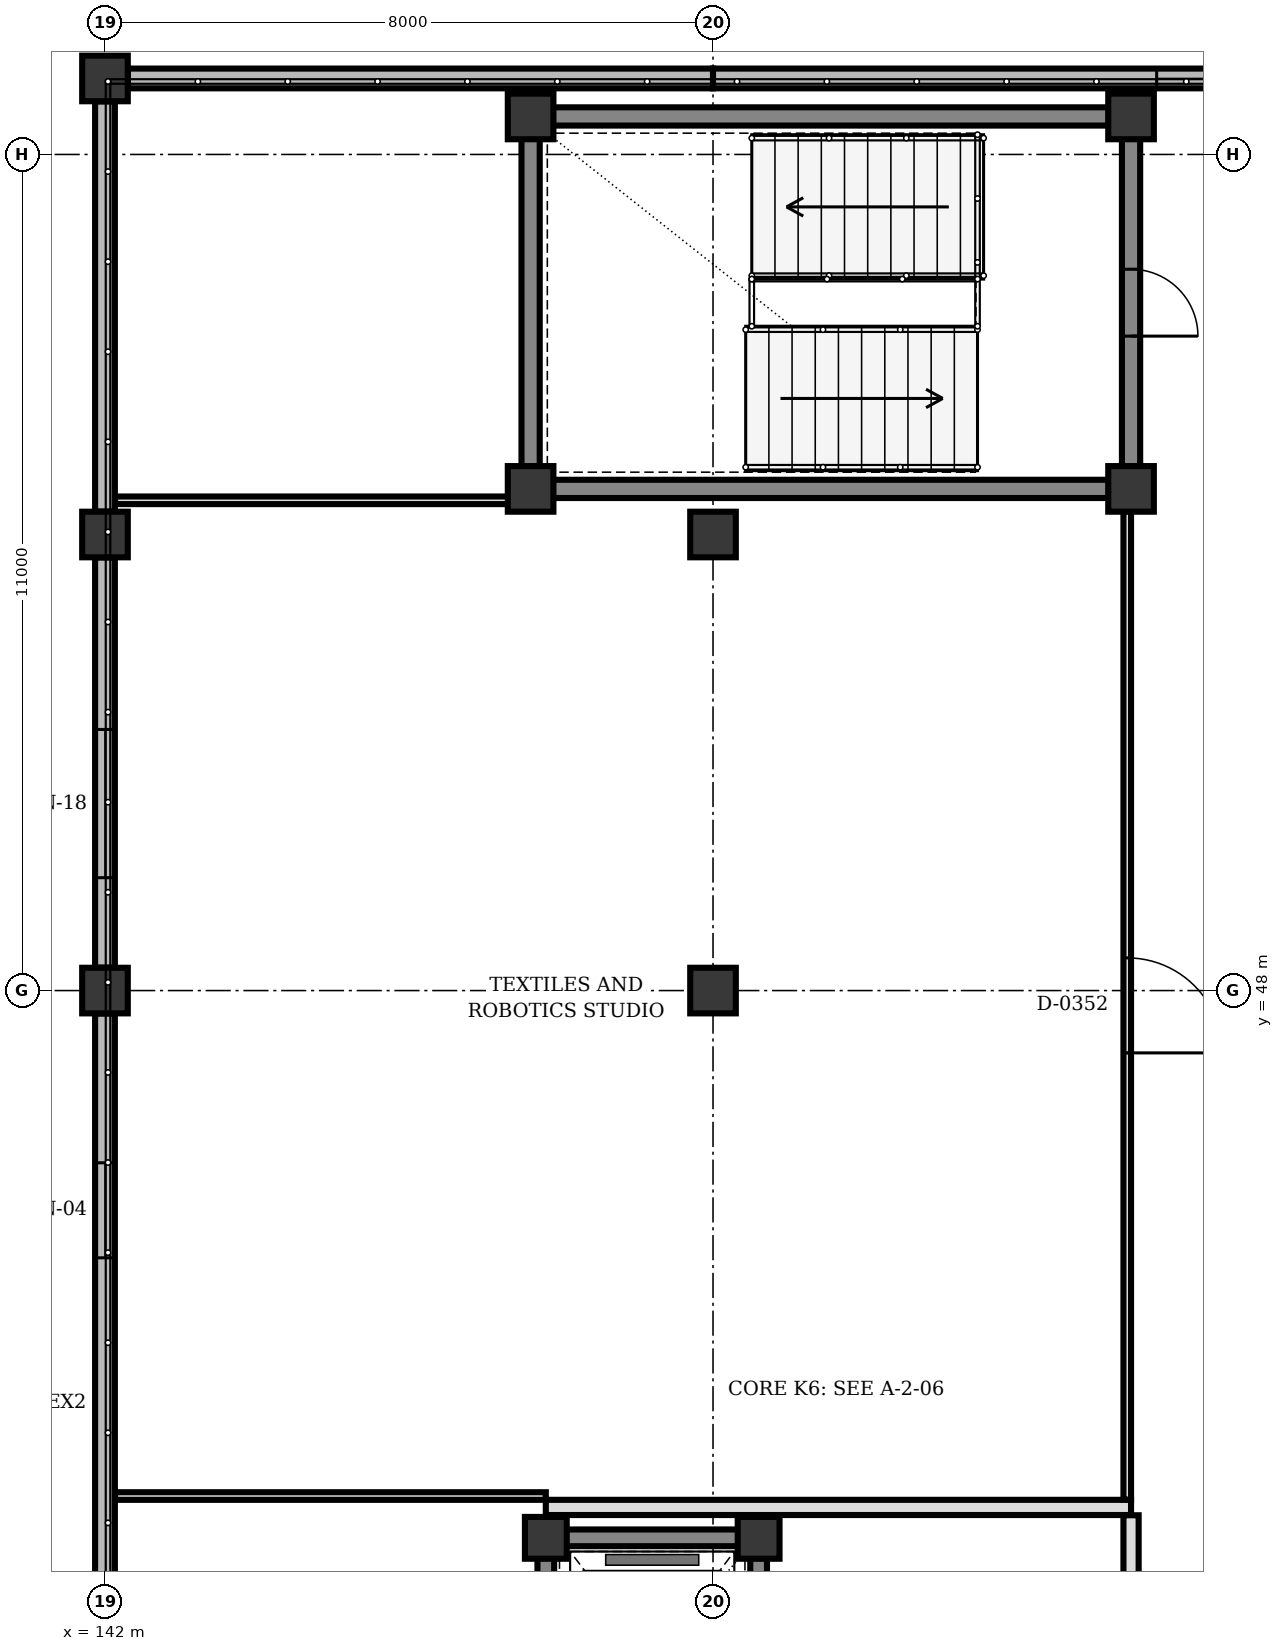
"""IFC4 building model, lengths in metres.
Left out: names, types, materials, properties, quantities, classifications, styles, units other than length and angle.
Written with IfcOpenShell. Run it as: python <this file> out.ifc"""

import sys

from ifc_helpers import new_model, si_unit, direction, frame, frame_2d, origin, origin_2d, place, context, subcontext, project, spatial, rectangle, extrude, element, fill, save


model = new_model("IFC4")
c1 = context("Model", 3, precision=1e-05, world=origin(), true_north=direction((0.0, 1.0)))
c2 = subcontext(c1, "Body", "Model", "MODEL_VIEW")
j1 = project(units=[si_unit("LENGTHUNIT", "METRE"), si_unit("PLANEANGLEUNIT", "RADIAN")], contexts=[c1])
p1 = place(None, origin())
s1 = spatial("IfcSite", under=j1, at=p1, CompositionType="ELEMENT")
p2 = place(p1, origin())
s2 = spatial("IfcBuilding", under=s1, at=p2, CompositionType="ELEMENT")
p3 = place(p2, frame((0.0, 0.0, 4.5)))
s3 = spatial("IfcBuildingStorey", under=s2, at=p3, CompositionType="ELEMENT", Elevation=4.5)
for number, where, z_axis, x_axis in (
    (1, (147.6, 54.6, 0.0), (0.0, 0.0, 1.0), (1.0, 0.0, 0.0)),
    (2, (155.5, 54.6, 0.0), (0.0, 0.0, 1.0), (1.0, 0.0, 0.0)),
    (3, (155.5, 59.5, 0.0), (0.0, 0.0, 1.0), (1.0, 0.0, 0.0)),
    (4, (147.6, 59.5, 0.0), (0.0, 0.0, 1.0), (1.0, 0.0, 0.0)),
):
    element("IfcColumn", number, at=place(p3, frame(where, z_axis=z_axis, x_axis=x_axis)), inside=s3, PredefinedType="COLUMN", context=c2, shape_type="SweptSolid", body=[
        extrude(rectangle(XDim=0.6, YDim=0.6, at=origin_2d()), origin(), (0.0, 0.0, 1.0), 4.0),
    ])
for number, where, z_axis, x_axis in (
    (5, (150.6, 40.8, 0.0), (0.0, 0.0, 1.0), (1.0, 0.0, 0.0)),
    (6, (147.8, 40.8, 0.0), (0.0, 0.0, 1.0), (1.0, 0.0, 0.0)),
):
    element("IfcColumn", number, at=place(p3, frame(where, z_axis=z_axis, x_axis=x_axis)), inside=s3, PredefinedType="COLUMN", context=c2, shape_type="SweptSolid", body=[
        extrude(rectangle(XDim=0.55, YDim=0.55, at=origin_2d()), origin(), (0.0, 0.0, 1.0), 4.0),
    ])
for number, where, z_axis, x_axis in (
    (7, (142.0, 48.0, 0.0), (0.0, 0.0, 1.0), (1.0, 0.0, 0.0)),
    (8, (142.0, 54.0, 0.0), (0.0, 0.0, 1.0), (1.0, 0.0, 0.0)),
    (9, (142.0, 60.0, 0.0), (0.0, 0.0, 1.0), (1.0, 0.0, 0.0)),
    (10, (150.0, 48.0, 0.0), (0.0, 0.0, 1.0), (1.0, 0.0, 0.0)),
    (11, (150.0, 54.0, 0.0), (0.0, 0.0, 1.0), (1.0, 0.0, 0.0)),
):
    element("IfcColumn", number, at=place(p3, frame(where, z_axis=z_axis, x_axis=x_axis)), inside=s3, PredefinedType="COLUMN", context=c2, shape_type="SweptSolid", body=[
        extrude(rectangle(XDim=0.6, YDim=0.6, at=origin_2d()), origin(), (0.0, 0.0, 1.0), 4.0),
    ])
p4 = place(p3, frame((142.0, 40.302, 0.0), z_axis=(0.0, 0.0, 1.0), x_axis=(0.0, 1.0, 0.0)))
e12 = element("IfcWall", 12, at=p4, inside=s3, PredefinedType="SOLIDWALL", context=c2, shape_type="SweptSolid", body=[
    extrude(rectangle(XDim=7.396, YDim=0.26, at=frame_2d((3.698, 0.0))), origin(), (0.0, 0.0, 1.0), 3.152),
])
p5 = place(p4, frame((4.182, 0.0, 0.9)))
e13 = element("IfcOpeningElement", 13, at=p5, cuts=e12, PredefinedType="OPENING", context=c2, shape_type="SweptSolid", body=[
    extrude(rectangle(XDim=1.25, YDim=1.1, at=frame_2d((0.625, 0.55))), frame((0.0, 0.14, 0.0), z_axis=(0.0, -1.0, 0.0), x_axis=(1.0, 0.0, 0.0)), (0.0, 0.0, 1.0), 0.28),
])
p6 = place(p3, frame((142.0, 48.302, 0.0), z_axis=(0.0, 0.0, 1.0), x_axis=(0.0, 1.0, 0.0)))
e14 = element("IfcWall", 14, at=p6, inside=s3, PredefinedType="SOLIDWALL", context=c2, shape_type="SweptSolid", body=[
    extrude(rectangle(XDim=5.396, YDim=0.26, at=frame_2d((2.698, 0.0))), origin(), (0.0, 0.0, 1.0), 3.152),
])
p7 = place(p6, frame((1.183, 0.0, 0.9)))
e15 = element("IfcOpeningElement", 15, at=p7, cuts=e14, PredefinedType="OPENING", context=c2, shape_type="SweptSolid", body=[
    extrude(rectangle(XDim=1.95, YDim=1.25, at=frame_2d((0.975, 0.625))), frame((0.0, 0.14, 0.0), z_axis=(0.0, -1.0, 0.0), x_axis=(1.0, 0.0, 0.0)), (0.0, 0.0, 1.0), 0.28),
])
p8 = place(p3, frame((142.0, 54.302, 0.0), z_axis=(0.0, 0.0, 1.0), x_axis=(0.0, 1.0, 0.0)))
e16 = element("IfcWall", 16, at=p8, inside=s3, PredefinedType="SOLIDWALL", context=c2, shape_type="SweptSolid", body=[
    extrude(rectangle(XDim=5.396, YDim=0.26, at=frame_2d((2.698, 0.0))), origin(), (0.0, 0.0, 1.0), 3.152),
])
p9 = place(p3, frame((142.302, 60.0, 0.0), z_axis=(0.0, 0.0, 1.0), x_axis=(1.0, 0.0, 0.0)))
e17 = element("IfcWall", 17, at=p9, inside=s3, PredefinedType="SOLIDWALL", context=c2, shape_type="SweptSolid", body=[
    extrude(rectangle(XDim=7.698, YDim=0.26, at=frame_2d((3.849, 0.0))), origin(), (0.0, 0.0, 1.0), 3.55),
])
p10 = place(p3, frame((150.0, 60.0, 0.0), z_axis=(0.0, 0.0, 1.0), x_axis=(1.0, 0.0, 0.0)))
e18 = element("IfcWall", 18, at=p10, inside=s3, PredefinedType="SOLIDWALL", context=c2, shape_type="SweptSolid", body=[
    extrude(rectangle(XDim=7.698, YDim=0.26, at=frame_2d((3.849, 0.0))), origin(), (0.0, 0.0, 1.0), 3.55),
])
p11 = place(p10, frame((5.837, 0.0, 0.9)))
e19 = element("IfcOpeningElement", 19, at=p11, cuts=e18, PredefinedType="OPENING", context=c2, shape_type="SweptSolid", body=[
    extrude(rectangle(XDim=0.95, YDim=1.1, at=frame_2d((0.475, 0.55))), frame((0.0, 0.14, 0.0), z_axis=(0.0, -1.0, 0.0), x_axis=(1.0, 0.0, 0.0)), (0.0, 0.0, 1.0), 0.28),
])
p12 = place(p3, frame((147.6, 54.892, 0.0), z_axis=(0.0, 0.0, 1.0), x_axis=(0.0, 1.0, 0.0)))
e20 = element("IfcWall", 20, at=p12, inside=s3, PredefinedType="SHEAR", context=c2, shape_type="SweptSolid", body=[
    extrude(rectangle(XDim=4.316, YDim=0.24, at=frame_2d((2.158, 0.0))), origin(), (0.0, 0.0, 1.0), 3.74),
])
p13 = place(p3, frame((155.5, 59.208, 0.0), z_axis=(0.0, 0.0, 1.0), x_axis=(0.0, -1.0, 0.0)))
e21 = element("IfcWall", 21, at=p13, inside=s3, PredefinedType="SHEAR", context=c2, shape_type="SweptSolid", body=[
    extrude(rectangle(XDim=4.316, YDim=0.24, at=frame_2d((2.158, 0.0))), origin(), (0.0, 0.0, 1.0), 3.74),
])
p14 = place(p13, frame((1.718, 0.0, 0.0)))
e22 = element("IfcOpeningElement", 22, at=p14, cuts=e21, PredefinedType="OPENING", context=c2, shape_type="SweptSolid", body=[
    extrude(rectangle(XDim=0.88, YDim=2.1, at=frame_2d((0.44, 1.05))), frame((0.0, 0.13, 0.0), z_axis=(0.0, -1.0, 0.0), x_axis=(1.0, 0.0, 0.0)), (0.0, 0.0, 1.0), 0.26),
])
for number, where, z_axis, x_axis in (
    (23, (155.208, 54.6, 0.0), (0.0, 0.0, 1.0), (-1.0, 0.0, 0.0)),
    (24, (155.208, 59.5, 0.0), (0.0, 0.0, 1.0), (-1.0, 0.0, 0.0)),
):
    element("IfcWall", number, at=place(p3, frame(where, z_axis=z_axis, x_axis=x_axis)), inside=s3, PredefinedType="SHEAR", context=c2, shape_type="SweptSolid", body=[
        extrude(rectangle(XDim=7.316, YDim=0.24, at=frame_2d((3.658, 0.0))), origin(), (0.0, 0.0, 1.0), 3.74),
    ])
p15 = place(p3, frame((150.6, 37.867, 0.0), z_axis=(0.0, 0.0, 1.0), x_axis=(0.0, 1.0, 0.0)))
e25 = element("IfcWall", 25, at=p15, inside=s3, PredefinedType="SHEAR", context=c2, shape_type="SweptSolid", body=[
    extrude(rectangle(XDim=2.666, YDim=0.22, at=frame_2d((1.333, 0.0))), origin(), (0.0, 0.0, 1.0), 3.74),
])
p16 = place(p15, frame((0.733, 0.0, 0.0)))
e26 = element("IfcOpeningElement", 26, at=p16, cuts=e25, PredefinedType="OPENING", context=c2, shape_type="SweptSolid", body=[
    extrude(rectangle(XDim=1.2, YDim=2.15, at=frame_2d((0.6, 1.075))), frame((0.0, 0.12, 0.0), z_axis=(0.0, -1.0, 0.0), x_axis=(1.0, 0.0, 0.0)), (0.0, 0.0, 1.0), 0.24),
])
p17 = place(p3, frame((150.333, 40.8, 0.0), z_axis=(0.0, 0.0, 1.0), x_axis=(-1.0, 0.0, 0.0)))
e27 = element("IfcWall", 27, at=p17, inside=s3, PredefinedType="SHEAR", context=c2, shape_type="SweptSolid", body=[
    extrude(rectangle(XDim=2.266, YDim=0.22, at=frame_2d((1.133, 0.0))), origin(), (0.0, 0.0, 1.0), 3.74),
])
p18 = place(p3, frame((147.8, 40.533, 0.0), z_axis=(0.0, 0.0, 1.0), x_axis=(0.0, -1.0, 0.0)))
e28 = element("IfcWall", 28, at=p18, inside=s3, PredefinedType="SHEAR", context=c2, shape_type="SweptSolid", body=[
    extrude(rectangle(XDim=2.666, YDim=0.22, at=frame_2d((1.333, 0.0))), origin(), (0.0, 0.0, 1.0), 3.74),
])
p19 = place(p3, frame((147.8, 41.2, 0.0), z_axis=(0.0, 0.0, 1.0), x_axis=(1.0, 0.0, 0.0)))
e29 = element("IfcWall", 29, at=p19, inside=s3, PredefinedType="PARTITIONING", context=c2, shape_type="SweptSolid", body=[
    extrude(rectangle(XDim=7.7, YDim=0.2, at=frame_2d((3.85, 0.0))), origin(), (0.0, 0.0, 1.0), 3.7),
])
p20 = place(p3, frame((155.5, 37.703, 0.0), z_axis=(0.0, 0.0, 1.0), x_axis=(0.0, 1.0, 0.0)))
e30 = element("IfcWall", 30, at=p20, inside=s3, PredefinedType="PARTITIONING", context=c2, shape_type="SweptSolid", body=[
    extrude(rectangle(XDim=3.394, YDim=0.2, at=frame_2d((1.697, 0.0))), origin(), (0.0, 0.0, 1.0), 3.7),
])
p21 = place(p20, frame((1.167, 0.0, 0.0)))
e31 = element("IfcOpeningElement", 31, at=p21, cuts=e30, PredefinedType="OPENING", context=c2, shape_type="SweptSolid", body=[
    extrude(rectangle(XDim=1.06, YDim=2.2, at=frame_2d((0.53, 1.1))), frame((0.0, 0.11, 0.0), z_axis=(0.0, -1.0, 0.0), x_axis=(1.0, 0.0, 0.0)), (0.0, 0.0, 1.0), 0.22),
])
p22 = place(p3, frame((142.133, 54.45, 0.0), z_axis=(0.0, 0.0, 1.0), x_axis=(1.0, 0.0, 0.0)))
e32 = element("IfcWall", 32, at=p22, inside=s3, PredefinedType="PARTITIONING", context=c2, shape_type="SweptSolid", body=[
    extrude(rectangle(XDim=5.175, YDim=0.1, at=frame_2d((2.587, 0.0))), origin(), (0.0, 0.0, 1.0), 3.152),
])
p23 = place(p3, frame((155.45, 54.308, 0.0), z_axis=(0.0, 0.0, 1.0), x_axis=(0.0, -1.0, 0.0)))
e33 = element("IfcWall", 33, at=p23, inside=s3, PredefinedType="PARTITIONING", context=c2, shape_type="SweptSolid", body=[
    extrude(rectangle(XDim=13.005, YDim=0.1, at=frame_2d((6.502, 0.0))), origin(), (0.0, 0.0, 1.0), 3.052),
])
p24 = place(p23, frame((5.878, 0.0, 0.0)))
e34 = element("IfcOpeningElement", 34, at=p24, cuts=e33, PredefinedType="OPENING", context=c2, shape_type="SweptSolid", body=[
    extrude(rectangle(XDim=1.25, YDim=2.2, at=frame_2d((0.625, 1.1))), frame((0.0, 0.06, 0.0), z_axis=(0.0, -1.0, 0.0), x_axis=(1.0, 0.0, 0.0)), (0.0, 0.0, 1.0), 0.12),
])
p25 = place(p3, frame((147.8, 41.35, 0.0), z_axis=(0.0, 0.0, 1.0), x_axis=(-1.0, 0.0, 0.0)))
e35 = element("IfcWall", 35, at=p25, inside=s3, PredefinedType="PARTITIONING", context=c2, shape_type="SweptSolid", body=[
    extrude(rectangle(XDim=5.667, YDim=0.1, at=frame_2d((2.833, 0.0))), origin(), (0.0, 0.0, 1.0), 3.152),
])
p26 = place(p5, origin())
e36 = element("IfcWindow", 36, at=p26, inside=s3, PartitioningType="SINGLE_PANEL", PredefinedType="WINDOW", context=c2, shape_type="SweptSolid", body=[
    extrude(rectangle(XDim=1.25, YDim=1.1, at=frame_2d((0.625, 0.55))), frame((0.0, 0.03, 0.0), z_axis=(0.0, -1.0, 0.0), x_axis=(1.0, 0.0, 0.0)), (0.0, 0.0, 1.0), 0.06),
])
fill(e13, e36)
p27 = place(p7, origin())
e37 = element("IfcWindow", 37, at=p27, inside=s3, PartitioningType="SINGLE_PANEL", PredefinedType="WINDOW", context=c2, shape_type="SweptSolid", body=[
    extrude(rectangle(XDim=1.95, YDim=1.25, at=frame_2d((0.975, 0.625))), frame((0.0, 0.03, 0.0), z_axis=(0.0, -1.0, 0.0), x_axis=(1.0, 0.0, 0.0)), (0.0, 0.0, 1.0), 0.06),
])
fill(e15, e37)
p28 = place(p11, origin())
e38 = element("IfcWindow", 38, at=p28, inside=s3, PartitioningType="SINGLE_PANEL", PredefinedType="WINDOW", context=c2, shape_type="SweptSolid", body=[
    extrude(rectangle(XDim=0.95, YDim=1.1, at=frame_2d((0.475, 0.55))), frame((0.0, 0.03, 0.0), z_axis=(0.0, -1.0, 0.0), x_axis=(1.0, 0.0, 0.0)), (0.0, 0.0, 1.0), 0.06),
])
fill(e19, e38)
p29 = place(p14, origin())
e39 = element("IfcDoor", 39, at=p29, inside=s3, OperationType="SINGLE_SWING_RIGHT", PredefinedType="DOOR", context=c2, shape_type="SweptSolid", body=[
    extrude(rectangle(XDim=0.88, YDim=2.1, at=frame_2d((0.44, 1.05))), frame((0.0, 0.025, 0.0), z_axis=(0.0, -1.0, 0.0), x_axis=(1.0, 0.0, 0.0)), (0.0, 0.0, 1.0), 0.05),
])
fill(e22, e39)
p30 = place(p24, origin())
e40 = element("IfcDoor", 40, at=p30, inside=s3, OperationType="SINGLE_SWING_RIGHT", PredefinedType="DOOR", context=c2, shape_type="SweptSolid", body=[
    extrude(rectangle(XDim=1.25, YDim=2.2, at=frame_2d((0.625, 1.1))), frame((0.0, 0.025, 0.0), z_axis=(0.0, -1.0, 0.0), x_axis=(1.0, 0.0, 0.0)), (0.0, 0.0, 1.0), 0.05),
])
fill(e34, e40)
save(model, sys.argv[1])
